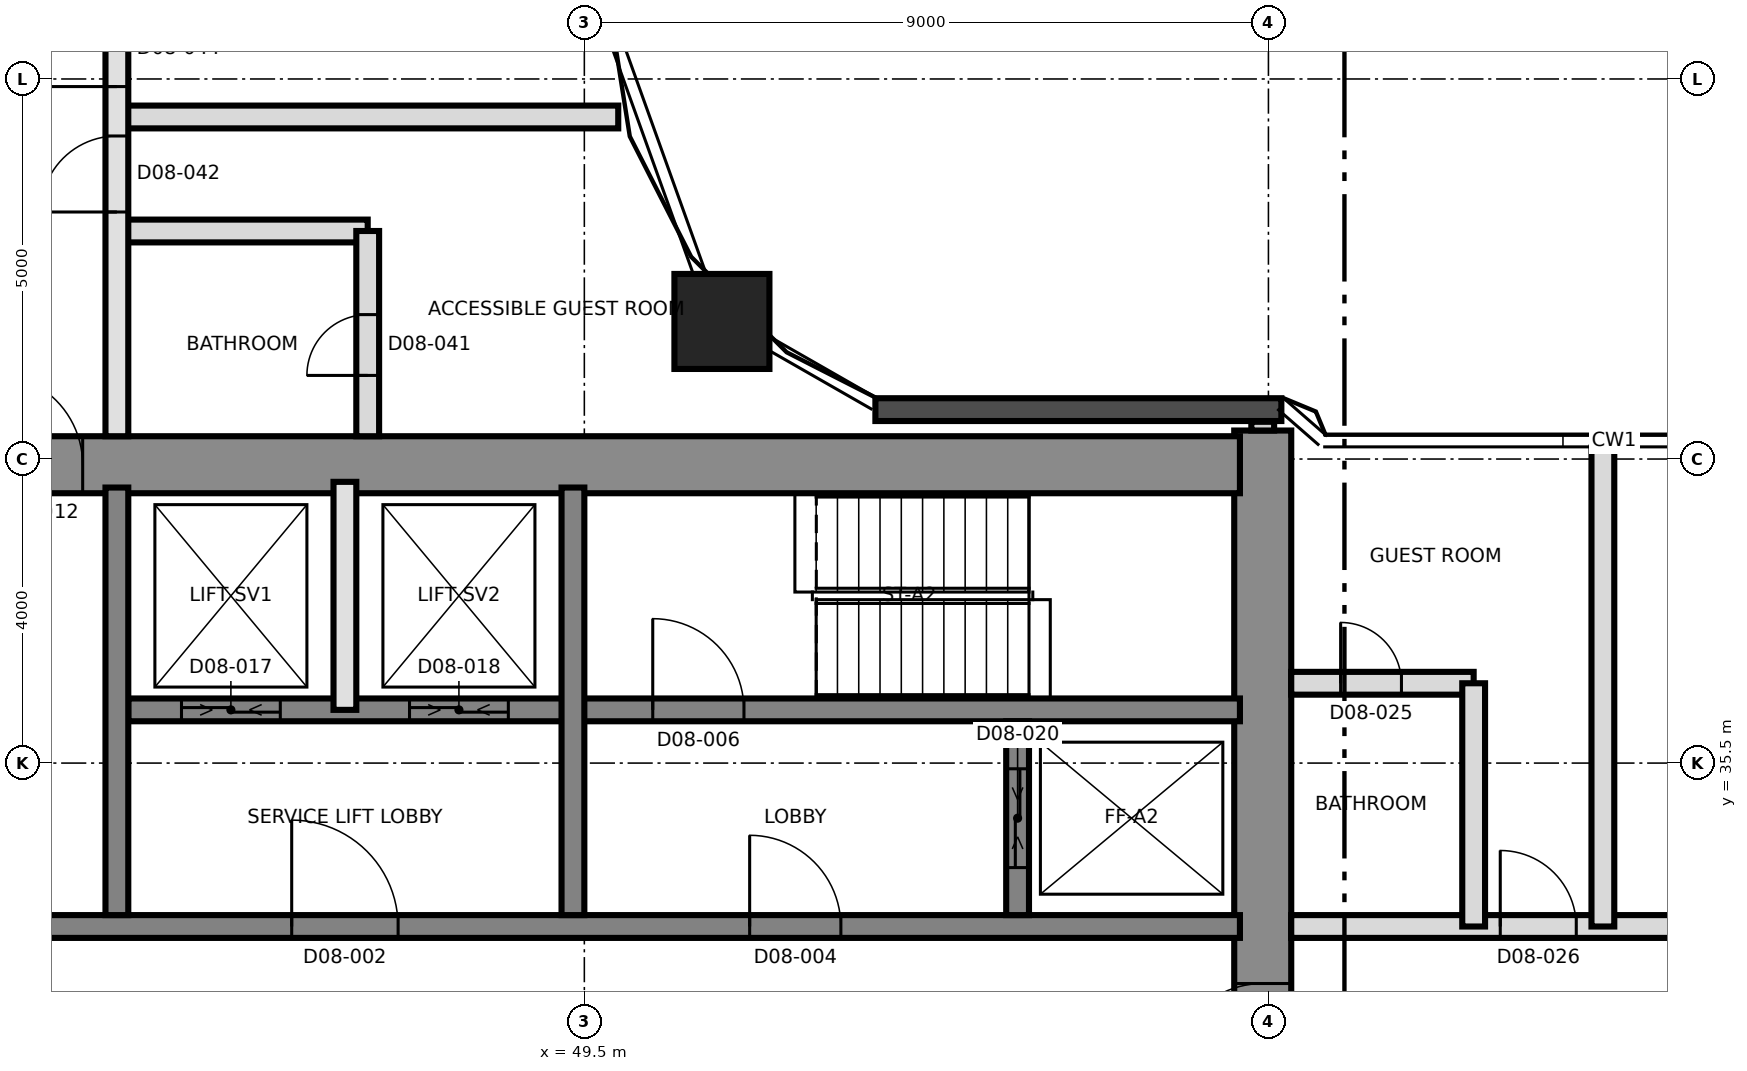
"""IFC4 building model, lengths in metres.
Left out: names, types, materials, properties, quantities, classifications, styles, units other than length and angle.
Written with IfcOpenShell. Run it as: python <this file> out.ifc"""

import sys

from ifc_helpers import new_model, si_unit, direction, frame, frame_2d, origin, origin_2d, place, context, subcontext, project, spatial, rectangle, extrude, element, fill, save


model = new_model("IFC4")
c1 = context("Model", 3, precision=1e-05, world=origin(), true_north=direction((0.0, 1.0)))
c2 = subcontext(c1, "Body", "Model", "MODEL_VIEW")
j1 = project(units=[si_unit("LENGTHUNIT", "METRE"), si_unit("PLANEANGLEUNIT", "RADIAN")], contexts=[c1])
p1 = place(None, origin())
s1 = spatial("IfcSite", under=j1, at=p1, CompositionType="ELEMENT")
p2 = place(p1, origin())
s2 = spatial("IfcBuilding", under=s1, at=p2, CompositionType="ELEMENT")
p3 = place(p2, frame((0.0, 0.0, 101.9)))
s3 = spatial("IfcBuildingStorey", under=s2, at=p3, CompositionType="ELEMENT", Elevation=101.9)
p4 = place(p3, frame((58.425, 21.125, 0.0), z_axis=(0.0, 0.0, 1.0), x_axis=(0.0, 1.0, 0.0)))
e1 = element("IfcWall", 1, at=p4, inside=s3, PredefinedType="SHEAR", context=c2, shape_type="SweptSolid", body=[
    extrude(rectangle(XDim=18.75, YDim=0.75, at=frame_2d((9.375, 0.0))), origin(), (0.0, 0.0, 1.0), 3.7),
])
p5 = place(p4, frame((10.275, 0.0, 0.0)))
e2 = element("IfcOpeningElement", 2, at=p5, cuts=e1, PredefinedType="OPENING", context=c2, shape_type="SweptSolid", body=[
    extrude(rectangle(XDim=1.2, YDim=2.1, at=frame_2d((0.6, 1.05))), frame((0.0, 0.385, 0.0), z_axis=(0.0, -1.0, 0.0), x_axis=(1.0, 0.0, 0.0)), (0.0, 0.0, 1.0), 0.77),
])
p6 = place(p3, frame((31.125, 39.425, 0.0), z_axis=(0.0, 0.0, 1.0), x_axis=(1.0, 0.0, 0.0)))
e3 = element("IfcWall", 3, at=p6, inside=s3, PredefinedType="SHEAR", context=c2, shape_type="SweptSolid", body=[
    extrude(rectangle(XDim=27.0, YDim=0.75, at=frame_2d((13.5, 0.0))), origin(), (0.0, 0.0, 1.0), 3.7),
])
p7 = place(p6, frame((10.575, 0.0, 0.0)))
e4 = element("IfcOpeningElement", 4, at=p7, cuts=e3, PredefinedType="OPENING", context=c2, shape_type="SweptSolid", body=[
    extrude(rectangle(XDim=1.2, YDim=2.1, at=frame_2d((0.6, 1.05))), frame((0.0, 0.385, 0.0), z_axis=(0.0, -1.0, 0.0), x_axis=(1.0, 0.0, 0.0)), (0.0, 0.0, 1.0), 0.77),
])
p8 = place(p3, frame((31.875, 33.35, 0.0), z_axis=(0.0, 0.0, 1.0), x_axis=(1.0, 0.0, 0.0)))
e5 = element("IfcWall", 5, at=p8, inside=s3, PredefinedType="SHEAR", context=c2, shape_type="SweptSolid", body=[
    extrude(rectangle(XDim=26.25, YDim=0.3, at=frame_2d((13.125, 0.0))), origin(), (0.0, 0.0, 1.0), 3.7),
])
p9 = place(p8, frame((13.775, 0.0, 0.0)))
e6 = element("IfcOpeningElement", 6, at=p9, cuts=e5, PredefinedType="OPENING", context=c2, shape_type="SweptSolid", body=[
    extrude(rectangle(XDim=1.4, YDim=2.1, at=frame_2d((0.7, 1.05))), frame((0.0, 0.16, 0.0), z_axis=(0.0, -1.0, 0.0), x_axis=(1.0, 0.0, 0.0)), (0.0, 0.0, 1.0), 0.32),
])
p10 = place(p8, frame((5.25, 0.0, 0.0)))
e7 = element("IfcOpeningElement", 7, at=p10, cuts=e5, PredefinedType="OPENING", context=c2, shape_type="SweptSolid", body=[
    extrude(rectangle(XDim=1.2, YDim=2.1, at=frame_2d((0.6, 1.05))), frame((0.0, 0.16, 0.0), z_axis=(0.0, -1.0, 0.0), x_axis=(1.0, 0.0, 0.0)), (0.0, 0.0, 1.0), 0.32),
])
p11 = place(p8, frame((19.8, 0.0, 0.0)))
e8 = element("IfcOpeningElement", 8, at=p11, cuts=e5, PredefinedType="OPENING", context=c2, shape_type="SweptSolid", body=[
    extrude(rectangle(XDim=1.2, YDim=2.1, at=frame_2d((0.6, 1.05))), frame((0.0, 0.16, 0.0), z_axis=(0.0, -1.0, 0.0), x_axis=(1.0, 0.0, 0.0)), (0.0, 0.0, 1.0), 0.32),
])
p12 = place(p3, frame((43.5, 36.2, 0.0), z_axis=(0.0, 0.0, 1.0), x_axis=(1.0, 0.0, 0.0)))
e9 = element("IfcWall", 9, at=p12, inside=s3, PredefinedType="SHEAR", context=c2, shape_type="SweptSolid", body=[
    extrude(rectangle(XDim=14.625, YDim=0.3, at=frame_2d((7.312, 0.0))), origin(), (0.0, 0.0, 1.0), 3.7),
])
p13 = place(p12, frame((6.9, 0.0, 0.0)))
e10 = element("IfcOpeningElement", 10, at=p13, cuts=e9, PredefinedType="OPENING", context=c2, shape_type="SweptSolid", body=[
    extrude(rectangle(XDim=1.2, YDim=2.1, at=frame_2d((0.6, 1.05))), frame((0.0, 0.16, 0.0), z_axis=(0.0, -1.0, 0.0), x_axis=(1.0, 0.0, 0.0)), (0.0, 0.0, 1.0), 0.32),
])
p14 = place(p12, frame((0.7, 0.0, 0.0)))
e11 = element("IfcOpeningElement", 11, at=p14, cuts=e9, PredefinedType="OPENING", context=c2, shape_type="SweptSolid", body=[
    extrude(rectangle(XDim=1.3, YDim=2.4, at=frame_2d((0.65, 1.2))), frame((0.0, 0.16, 0.0), z_axis=(0.0, -1.0, 0.0), x_axis=(1.0, 0.0, 0.0)), (0.0, 0.0, 1.0), 0.32),
])
p15 = place(p12, frame((3.7, 0.0, 0.0)))
e12 = element("IfcOpeningElement", 12, at=p15, cuts=e9, PredefinedType="OPENING", context=c2, shape_type="SweptSolid", body=[
    extrude(rectangle(XDim=1.3, YDim=2.4, at=frame_2d((0.65, 1.2))), frame((0.0, 0.16, 0.0), z_axis=(0.0, -1.0, 0.0), x_axis=(1.0, 0.0, 0.0)), (0.0, 0.0, 1.0), 0.32),
])
for number, where, z_axis, x_axis in (
    (13, (43.35, 33.5, 0.0), (0.0, 0.0, 1.0), (0.0, 1.0, 0.0)),
    (14, (49.35, 33.5, 0.0), (0.0, 0.0, 1.0), (0.0, 1.0, 0.0)),
):
    element("IfcWall", number, at=place(p3, frame(where, z_axis=z_axis, x_axis=x_axis)), inside=s3, PredefinedType="SHEAR", context=c2, shape_type="SweptSolid", body=[
        extrude(rectangle(XDim=5.625, YDim=0.3, at=frame_2d((2.812, 0.0))), origin(), (0.0, 0.0, 1.0), 3.7),
    ])
p16 = place(p3, frame((55.2, 33.5, 0.0), z_axis=(0.0, 0.0, 1.0), x_axis=(0.0, 1.0, 0.0)))
e15 = element("IfcWall", 15, at=p16, inside=s3, PredefinedType="SHEAR", context=c2, shape_type="SweptSolid", body=[
    extrude(rectangle(XDim=2.55, YDim=0.3, at=frame_2d((1.275, 0.0))), origin(), (0.0, 0.0, 1.0), 3.7),
])
p17 = place(p16, frame((0.625, 0.0, 0.0)))
e16 = element("IfcOpeningElement", 16, at=p17, cuts=e15, PredefinedType="OPENING", context=c2, shape_type="SweptSolid", body=[
    extrude(rectangle(XDim=1.3, YDim=2.4, at=frame_2d((0.65, 1.2))), frame((0.0, 0.16, 0.0), z_axis=(0.0, -1.0, 0.0), x_axis=(1.0, 0.0, 0.0)), (0.0, 0.0, 1.0), 0.32),
])
p18 = place(p3, frame((51.31, 41.31, 0.0), z_axis=(0.0, 0.0, 1.0), x_axis=(1.0, 0.0, 0.0)))
e17 = element("IfcColumn", 17, at=p18, inside=s3, PredefinedType="COLUMN", context=c2, shape_type="SweptSolid", body=[
    extrude(rectangle(XDim=1.25, YDim=1.25, at=origin_2d()), origin(), (0.0, 0.0, 1.0), 3.7),
])
p19 = place(p3, frame((58.67, 40.15, 0.0), z_axis=(0.0, 0.0, 1.0), x_axis=(-1.0, 0.0, 0.0)))
e18 = element("IfcWall", 18, at=p19, inside=s3, PredefinedType="SOLIDWALL", context=c2, shape_type="SweptSolid", body=[
    extrude(rectangle(XDim=5.341, YDim=0.3, at=frame_2d((2.67, 0.0))), origin(), (0.0, 0.0, 1.0), 3.4),
])
p20 = place(p3, frame((46.35, 36.2, 0.0), z_axis=(0.0, 0.0, 1.0), x_axis=(0.0, 1.0, 0.0)))
e19 = element("IfcWall", 19, at=p20, inside=s3, PredefinedType="SOLIDWALL", context=c2, shape_type="SweptSolid", body=[
    extrude(rectangle(XDim=3.0, YDim=0.3, at=frame_2d((1.5, 0.0))), origin(), (0.0, 0.0, 1.0), 3.4),
])
p21 = place(p3, frame((58.8, 33.35, 0.0), z_axis=(0.0, 0.0, 1.0), x_axis=(1.0, 0.0, 0.0)))
e20 = element("IfcWall", 20, at=p21, inside=s3, PredefinedType="PARTITIONING", context=c2, shape_type="SweptSolid", body=[
    extrude(rectangle(XDim=26.53, YDim=0.3, at=frame_2d((13.265, 0.0))), origin(), (0.0, 0.0, 1.0), 3.4),
])
p22 = place(p21, frame((2.75, 0.0, 0.0)))
e21 = element("IfcOpeningElement", 21, at=p22, cuts=e20, PredefinedType="OPENING", context=c2, shape_type="SweptSolid", body=[
    extrude(rectangle(XDim=1.0, YDim=2.1, at=frame_2d((0.5, 1.05))), frame((0.0, 0.16, 0.0), z_axis=(0.0, -1.0, 0.0), x_axis=(1.0, 0.0, 0.0)), (0.0, 0.0, 1.0), 0.32),
])
p23 = place(p21, frame((5.7, 0.0, 0.0)))
e22 = element("IfcOpeningElement", 22, at=p23, cuts=e20, PredefinedType="OPENING", context=c2, shape_type="SweptSolid", body=[
    extrude(rectangle(XDim=1.4, YDim=2.1, at=frame_2d((0.7, 1.05))), frame((0.0, 0.16, 0.0), z_axis=(0.0, -1.0, 0.0), x_axis=(1.0, 0.0, 0.0)), (0.0, 0.0, 1.0), 0.32),
])
p24 = place(p21, frame((14.35, 0.0, 0.0)))
e23 = element("IfcOpeningElement", 23, at=p24, cuts=e20, PredefinedType="OPENING", context=c2, shape_type="SweptSolid", body=[
    extrude(rectangle(XDim=1.0, YDim=2.4, at=frame_2d((0.5, 1.2))), frame((0.0, 0.16, 0.0), z_axis=(0.0, -1.0, 0.0), x_axis=(1.0, 0.0, 0.0)), (0.0, 0.0, 1.0), 0.32),
])
p25 = place(p21, frame((18.835, 0.0, 0.0)))
e24 = element("IfcOpeningElement", 24, at=p25, cuts=e20, PredefinedType="OPENING", context=c2, shape_type="SweptSolid", body=[
    extrude(rectangle(XDim=1.2, YDim=2.1, at=frame_2d((0.6, 1.05))), frame((0.0, 0.16, 0.0), z_axis=(0.0, -1.0, 0.0), x_axis=(1.0, 0.0, 0.0)), (0.0, 0.0, 1.0), 0.32),
])
p26 = place(p21, frame((22.085, 0.0, 0.0)))
e25 = element("IfcOpeningElement", 25, at=p26, cuts=e20, PredefinedType="OPENING", context=c2, shape_type="SweptSolid", body=[
    extrude(rectangle(XDim=1.0, YDim=2.1, at=frame_2d((0.5, 1.05))), frame((0.0, 0.16, 0.0), z_axis=(0.0, -1.0, 0.0), x_axis=(1.0, 0.0, 0.0)), (0.0, 0.0, 1.0), 0.32),
])
p27 = place(p3, frame((58.8, 36.55, 0.0), z_axis=(0.0, 0.0, 1.0), x_axis=(1.0, 0.0, 0.0)))
e26 = element("IfcWall", 26, at=p27, inside=s3, PredefinedType="PARTITIONING", context=c2, shape_type="SweptSolid", body=[
    extrude(rectangle(XDim=2.4, YDim=0.3, at=frame_2d((1.2, 0.0))), origin(), (0.0, 0.0, 1.0), 3.4),
])
p28 = place(p27, frame((0.65, 0.0, 0.0)))
e27 = element("IfcOpeningElement", 27, at=p28, cuts=e26, PredefinedType="OPENING", context=c2, shape_type="SweptSolid", body=[
    extrude(rectangle(XDim=0.8, YDim=2.1, at=frame_2d((0.4, 1.05))), frame((0.0, 0.16, 0.0), z_axis=(0.0, -1.0, 0.0), x_axis=(1.0, 0.0, 0.0)), (0.0, 0.0, 1.0), 0.32),
])
p29 = place(p3, frame((43.35, 42.5, 0.0), z_axis=(0.0, 0.0, 1.0), x_axis=(1.0, 0.0, 0.0)))
e28 = element("IfcWall", 28, at=p29, inside=s3, PredefinedType="PARTITIONING", context=c2, shape_type="SweptSolid", body=[
    extrude(rectangle(XDim=3.3, YDim=0.3, at=frame_2d((1.65, 0.0))), origin(), (0.0, 0.0, 1.0), 3.4),
])
p30 = place(p3, frame((43.35, 44.0, 0.0), z_axis=(0.0, 0.0, 1.0), x_axis=(1.0, 0.0, 0.0)))
e29 = element("IfcWall", 29, at=p30, inside=s3, PredefinedType="PARTITIONING", context=c2, shape_type="SweptSolid", body=[
    extrude(rectangle(XDim=6.596, YDim=0.3, at=frame_2d((3.298, 0.0))), origin(), (0.0, 0.0, 1.0), 3.4),
])
p31 = place(p3, frame((43.35, 39.8, 0.0), z_axis=(0.0, 0.0, 1.0), x_axis=(0.0, 1.0, 0.0)))
e30 = element("IfcWall", 30, at=p31, inside=s3, PredefinedType="SOLIDWALL", context=c2, shape_type="SweptSolid", body=[
    extrude(rectangle(XDim=25.95, YDim=0.3, at=frame_2d((12.975, 0.0))), origin(), (0.0, 0.0, 1.0), 3.4),
])
p32 = place(p31, frame((2.95, 0.0, 0.0)))
e31 = element("IfcOpeningElement", 31, at=p32, cuts=e30, PredefinedType="OPENING", context=c2, shape_type="SweptSolid", body=[
    extrude(rectangle(XDim=1.0, YDim=2.1, at=frame_2d((0.5, 1.05))), frame((0.0, 0.16, 0.0), z_axis=(0.0, -1.0, 0.0), x_axis=(1.0, 0.0, 0.0)), (0.0, 0.0, 1.0), 0.32),
])
p33 = place(p31, frame((4.6, 0.0, 0.0)))
e32 = element("IfcOpeningElement", 32, at=p33, cuts=e30, PredefinedType="OPENING", context=c2, shape_type="SweptSolid", body=[
    extrude(rectangle(XDim=1.0, YDim=2.1, at=frame_2d((0.5, 1.05))), frame((0.0, 0.16, 0.0), z_axis=(0.0, -1.0, 0.0), x_axis=(1.0, 0.0, 0.0)), (0.0, 0.0, 1.0), 0.32),
])
p34 = place(p31, frame((14.35, 0.0, 0.0)))
e33 = element("IfcOpeningElement", 33, at=p34, cuts=e30, PredefinedType="OPENING", context=c2, shape_type="SweptSolid", body=[
    extrude(rectangle(XDim=1.0, YDim=2.4, at=frame_2d((0.5, 1.2))), frame((0.0, 0.16, 0.0), z_axis=(0.0, -1.0, 0.0), x_axis=(1.0, 0.0, 0.0)), (0.0, 0.0, 1.0), 0.32),
])
p35 = place(p31, frame((19.7, 0.0, 0.0)))
e34 = element("IfcOpeningElement", 34, at=p35, cuts=e30, PredefinedType="OPENING", context=c2, shape_type="SweptSolid", body=[
    extrude(rectangle(XDim=1.0, YDim=2.4, at=frame_2d((0.5, 1.2))), frame((0.0, 0.16, 0.0), z_axis=(0.0, -1.0, 0.0), x_axis=(1.0, 0.0, 0.0)), (0.0, 0.0, 1.0), 0.32),
])
p36 = place(p3, frame((46.65, 39.8, 0.0), z_axis=(0.0, 0.0, 1.0), x_axis=(0.0, 1.0, 0.0)))
e35 = element("IfcWall", 35, at=p36, inside=s3, PredefinedType="PARTITIONING", context=c2, shape_type="SweptSolid", body=[
    extrude(rectangle(XDim=2.7, YDim=0.3, at=frame_2d((1.35, 0.0))), origin(), (0.0, 0.0, 1.0), 3.4),
])
p37 = place(p36, frame((0.8, 0.0, 0.0)))
e36 = element("IfcOpeningElement", 36, at=p37, cuts=e35, PredefinedType="OPENING", context=c2, shape_type="SweptSolid", body=[
    extrude(rectangle(XDim=0.8, YDim=2.1, at=frame_2d((0.4, 1.05))), frame((0.0, 0.16, 0.0), z_axis=(0.0, -1.0, 0.0), x_axis=(1.0, 0.0, 0.0)), (0.0, 0.0, 1.0), 0.32),
])
p38 = place(p3, frame((61.2, 33.35, 0.0), z_axis=(0.0, 0.0, 1.0), x_axis=(0.0, 1.0, 0.0)))
e37 = element("IfcWall", 37, at=p38, inside=s3, PredefinedType="PARTITIONING", context=c2, shape_type="SweptSolid", body=[
    extrude(rectangle(XDim=3.2, YDim=0.3, at=frame_2d((1.6, 0.0))), origin(), (0.0, 0.0, 1.0), 3.4),
])
p39 = place(p3, frame((62.9, 33.35, 0.0), z_axis=(0.0, 0.0, 1.0), x_axis=(0.0, 1.0, 0.0)))
e38 = element("IfcWall", 38, at=p39, inside=s3, PredefinedType="PARTITIONING", context=c2, shape_type="SweptSolid", body=[
    extrude(rectangle(XDim=6.3, YDim=0.3, at=frame_2d((3.15, 0.0))), origin(), (0.0, 0.0, 1.0), 3.4),
])
p40 = place(p3, frame((58.425, 39.875, 0.0), z_axis=(0.0, 0.0, 1.0), x_axis=(0.0, 1.0, 0.0)))
e39 = element("IfcWall", 39, at=p40, inside=s3, PredefinedType="PARTITIONING", context=c2, shape_type="SweptSolid", body=[
    extrude(rectangle(XDim=0.115, YDim=0.3, at=frame_2d((0.058, 0.0))), origin(), (0.0, 0.0, 1.0), 3.4),
])
p41 = place(p9, origin())
e40 = element("IfcDoor", 40, at=p41, inside=s3, OperationType="SINGLE_SWING_RIGHT", PredefinedType="DOOR", context=c2, shape_type="SweptSolid", body=[
    extrude(rectangle(XDim=1.4, YDim=2.1, at=frame_2d((0.7, 1.05))), frame((0.0, 0.025, 0.0), z_axis=(0.0, -1.0, 0.0), x_axis=(1.0, 0.0, 0.0)), (0.0, 0.0, 1.0), 0.05),
])
fill(e6, e40)
p42 = place(p11, origin())
e41 = element("IfcDoor", 41, at=p42, inside=s3, OperationType="SINGLE_SWING_RIGHT", PredefinedType="DOOR", context=c2, shape_type="SweptSolid", body=[
    extrude(rectangle(XDim=1.2, YDim=2.1, at=frame_2d((0.6, 1.05))), frame((0.0, 0.025, 0.0), z_axis=(0.0, -1.0, 0.0), x_axis=(1.0, 0.0, 0.0)), (0.0, 0.0, 1.0), 0.05),
])
fill(e8, e41)
p43 = place(p13, origin())
e42 = element("IfcDoor", 42, at=p43, inside=s3, OperationType="SINGLE_SWING_LEFT", PredefinedType="DOOR", context=c2, shape_type="SweptSolid", body=[
    extrude(rectangle(XDim=1.2, YDim=2.1, at=frame_2d((0.6, 1.05))), frame((0.0, 0.025, 0.0), z_axis=(0.0, -1.0, 0.0), x_axis=(1.0, 0.0, 0.0)), (0.0, 0.0, 1.0), 0.05),
])
fill(e10, e42)
p44 = place(p5, origin())
e43 = element("IfcDoor", 43, at=p44, inside=s3, OperationType="SINGLE_SWING_LEFT", PredefinedType="DOOR", context=c2, shape_type="SweptSolid", body=[
    extrude(rectangle(XDim=1.2, YDim=2.1, at=frame_2d((0.6, 1.05))), frame((0.0, 0.025, 0.0), z_axis=(0.0, -1.0, 0.0), x_axis=(1.0, 0.0, 0.0)), (0.0, 0.0, 1.0), 0.05),
])
fill(e2, e43)
p45 = place(p7, origin())
e44 = element("IfcDoor", 44, at=p45, inside=s3, OperationType="SINGLE_SWING_RIGHT", PredefinedType="DOOR", context=c2, shape_type="SweptSolid", body=[
    extrude(rectangle(XDim=1.2, YDim=2.1, at=frame_2d((0.6, 1.05))), frame((0.0, 0.025, 0.0), z_axis=(0.0, -1.0, 0.0), x_axis=(1.0, 0.0, 0.0)), (0.0, 0.0, 1.0), 0.05),
])
fill(e4, e44)
p46 = place(p14, origin())
e45 = element("IfcDoor", 45, at=p46, inside=s3, OperationType="SLIDING_TO_LEFT", PredefinedType="DOOR", context=c2, shape_type="SweptSolid", body=[
    extrude(rectangle(XDim=1.3, YDim=2.4, at=frame_2d((0.65, 1.2))), frame((0.0, 0.025, 0.0), z_axis=(0.0, -1.0, 0.0), x_axis=(1.0, 0.0, 0.0)), (0.0, 0.0, 1.0), 0.05),
])
fill(e11, e45)
p47 = place(p15, origin())
e46 = element("IfcDoor", 46, at=p47, inside=s3, OperationType="SLIDING_TO_LEFT", PredefinedType="DOOR", context=c2, shape_type="SweptSolid", body=[
    extrude(rectangle(XDim=1.3, YDim=2.4, at=frame_2d((0.65, 1.2))), frame((0.0, 0.025, 0.0), z_axis=(0.0, -1.0, 0.0), x_axis=(1.0, 0.0, 0.0)), (0.0, 0.0, 1.0), 0.05),
])
fill(e12, e46)
p48 = place(p17, origin())
e47 = element("IfcDoor", 47, at=p48, inside=s3, OperationType="SLIDING_TO_LEFT", PredefinedType="DOOR", context=c2, shape_type="SweptSolid", body=[
    extrude(rectangle(XDim=1.3, YDim=2.4, at=frame_2d((0.65, 1.2))), frame((0.0, 0.025, 0.0), z_axis=(0.0, -1.0, 0.0), x_axis=(1.0, 0.0, 0.0)), (0.0, 0.0, 1.0), 0.05),
])
fill(e16, e47)
p49 = place(p28, origin())
e48 = element("IfcDoor", 48, at=p49, inside=s3, OperationType="SINGLE_SWING_LEFT", PredefinedType="DOOR", context=c2, shape_type="SweptSolid", body=[
    extrude(rectangle(XDim=0.8, YDim=2.1, at=frame_2d((0.4, 1.05))), frame((0.0, 0.025, 0.0), z_axis=(0.0, -1.0, 0.0), x_axis=(1.0, 0.0, 0.0)), (0.0, 0.0, 1.0), 0.05),
])
fill(e27, e48)
p50 = place(p22, origin())
e49 = element("IfcDoor", 49, at=p50, inside=s3, OperationType="SINGLE_SWING_LEFT", PredefinedType="DOOR", context=c2, shape_type="SweptSolid", body=[
    extrude(rectangle(XDim=1.0, YDim=2.1, at=frame_2d((0.5, 1.05))), frame((0.0, 0.025, 0.0), z_axis=(0.0, -1.0, 0.0), x_axis=(1.0, 0.0, 0.0)), (0.0, 0.0, 1.0), 0.05),
])
fill(e21, e49)
p51 = place(p37, origin())
e50 = element("IfcDoor", 50, at=p51, inside=s3, OperationType="SINGLE_SWING_RIGHT", PredefinedType="DOOR", context=c2, shape_type="SweptSolid", body=[
    extrude(rectangle(XDim=0.8, YDim=2.1, at=frame_2d((0.4, 1.05))), frame((0.0, 0.025, 0.0), z_axis=(0.0, -1.0, 0.0), x_axis=(1.0, 0.0, 0.0)), (0.0, 0.0, 1.0), 0.05),
])
fill(e36, e50)
p52 = place(p32, origin())
e51 = element("IfcDoor", 51, at=p52, inside=s3, OperationType="SINGLE_SWING_LEFT", PredefinedType="DOOR", context=c2, shape_type="SweptSolid", body=[
    extrude(rectangle(XDim=1.0, YDim=2.1, at=frame_2d((0.5, 1.05))), frame((0.0, 0.025, 0.0), z_axis=(0.0, -1.0, 0.0), x_axis=(1.0, 0.0, 0.0)), (0.0, 0.0, 1.0), 0.05),
])
fill(e31, e51)
p53 = place(p33, origin())
e52 = element("IfcDoor", 52, at=p53, inside=s3, OperationType="SINGLE_SWING_LEFT", PredefinedType="DOOR", context=c2, shape_type="SweptSolid", body=[
    extrude(rectangle(XDim=1.0, YDim=2.1, at=frame_2d((0.5, 1.05))), frame((0.0, 0.025, 0.0), z_axis=(0.0, -1.0, 0.0), x_axis=(1.0, 0.0, 0.0)), (0.0, 0.0, 1.0), 0.05),
])
fill(e32, e52)
save(model, sys.argv[1])
